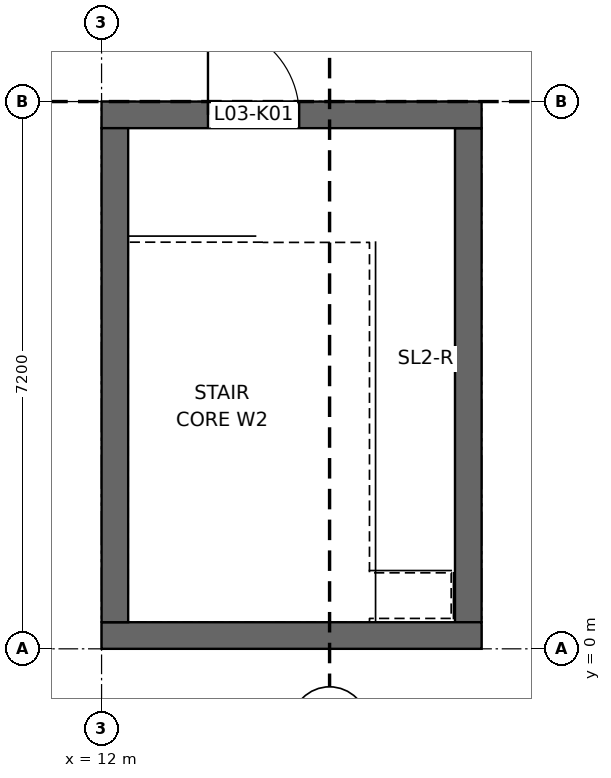
"""IFC4 building model, lengths in metres.
Left out: names, types, materials, properties, quantities, classifications, styles, units other than length and angle.
Written with IfcOpenShell. Run it as: python <this file> out.ifc"""

import sys

from ifc_helpers import new_model, si_unit, direction, frame, frame_2d, origin, place, context, subcontext, project, spatial, rectangle, extrude, element, fill, save


model = new_model("IFC4")
c1 = context("Model", 3, precision=1e-05, world=origin(), true_north=direction((0.0, 1.0)))
c2 = subcontext(c1, "Body", "Model", "MODEL_VIEW")
j1 = project(units=[si_unit("LENGTHUNIT", "METRE"), si_unit("PLANEANGLEUNIT", "RADIAN")], contexts=[c1])
p1 = place(None, origin())
s1 = spatial("IfcSite", under=j1, at=p1, CompositionType="ELEMENT")
p2 = place(p1, origin())
s2 = spatial("IfcBuilding", under=s1, at=p2, CompositionType="ELEMENT")
p3 = place(p2, frame((0.0, 0.0, 12.6)))
s3 = spatial("IfcBuildingStorey", under=s2, at=p3, CompositionType="ELEMENT", Elevation=12.6)
p4 = place(p3, frame((12.0, 0.175, 0.0), z_axis=(0.0, 0.0, 1.0), x_axis=(1.0, 0.0, 0.0)))
e1 = element("IfcWall", 1, at=p4, inside=s3, PredefinedType="SHEAR", context=c2, shape_type="SweptSolid", body=[
    extrude(rectangle(XDim=5.0, YDim=0.35, at=frame_2d((2.5, 0.0))), origin(), (0.0, 0.0, 1.0), 2.4),
])
p5 = place(p3, frame((12.0, 7.025, 0.0), z_axis=(0.0, 0.0, 1.0), x_axis=(1.0, 0.0, 0.0)))
e2 = element("IfcWall", 2, at=p5, inside=s3, PredefinedType="SHEAR", context=c2, shape_type="SweptSolid", body=[
    extrude(rectangle(XDim=5.0, YDim=0.35, at=frame_2d((2.5, 0.0))), origin(), (0.0, 0.0, 1.0), 2.4),
])
p6 = place(p5, frame((1.4, 0.0, 0.0)))
e3 = element("IfcOpeningElement", 3, at=p6, cuts=e2, PredefinedType="OPENING", context=c2, shape_type="SweptSolid", body=[
    extrude(rectangle(XDim=1.2, YDim=2.1, at=frame_2d((0.6, 1.05))), frame((0.0, 0.185, 0.0), z_axis=(0.0, -1.0, 0.0), x_axis=(1.0, 0.0, 0.0)), (0.0, 0.0, 1.0), 0.37),
])
for number, where, z_axis, x_axis in (
    (4, (12.175, 0.35, 0.0), (0.0, 0.0, 1.0), (0.0, 1.0, 0.0)),
    (5, (16.825, 0.35, 0.0), (0.0, 0.0, 1.0), (0.0, 1.0, 0.0)),
):
    element("IfcWall", number, at=place(p3, frame(where, z_axis=z_axis, x_axis=x_axis)), inside=s3, PredefinedType="SHEAR", context=c2, shape_type="SweptSolid", body=[
        extrude(rectangle(XDim=6.5, YDim=0.35, at=frame_2d((3.25, 0.0))), origin(), (0.0, 0.0, 1.0), 2.4),
    ])
p7 = place(p3, frame((0.0, 0.09, 0.0), z_axis=(0.0, 0.0, 1.0), x_axis=(1.0, 0.0, 0.0)))
e6 = element("IfcWall", 6, at=p7, inside=s3, PredefinedType="PARAPET", context=c2, shape_type="SweptSolid", body=[
    extrude(rectangle(XDim=12.0, YDim=0.18, at=frame_2d((6.0, 0.0))), origin(), (0.0, 0.0, 1.0), 1.1),
])
p8 = place(p6, origin())
e7 = element("IfcDoor", 7, at=p8, inside=s3, OperationType="SINGLE_SWING_LEFT", PredefinedType="DOOR", context=c2, shape_type="SweptSolid", body=[
    extrude(rectangle(XDim=1.2, YDim=2.1, at=frame_2d((0.6, 1.05))), frame((0.0, 0.025, 0.0), z_axis=(0.0, -1.0, 0.0), x_axis=(1.0, 0.0, 0.0)), (0.0, 0.0, 1.0), 0.05),
])
fill(e3, e7)
save(model, sys.argv[1])
